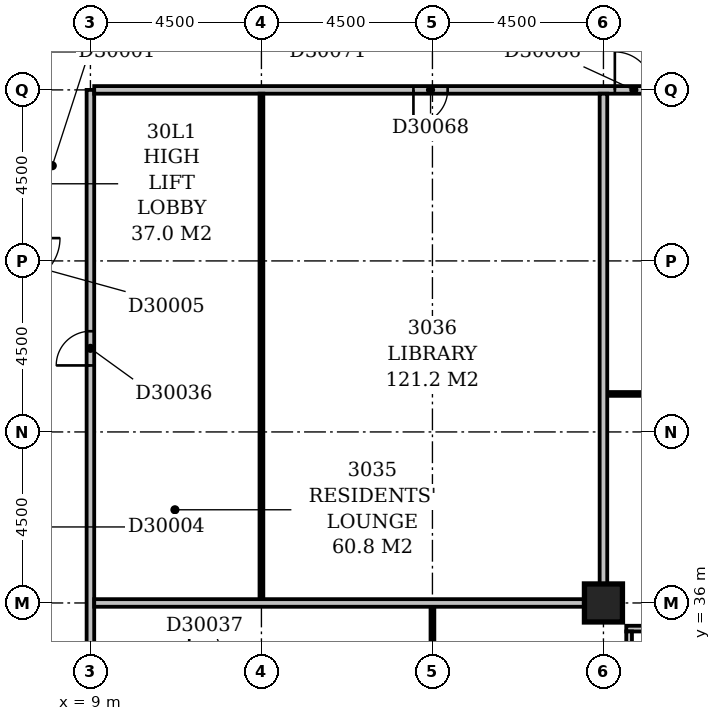
"""IFC4 building model, lengths in metres.
Left out: names, types, materials, properties, quantities, classifications, styles, units other than length and angle.
Written with IfcOpenShell. Run it as: python <this file> out.ifc"""

import sys

from ifc_helpers import new_model, si_unit, direction, frame, frame_2d, origin, origin_2d, place, context, subcontext, project, spatial, rectangle, extrude, element, fill, save


model = new_model("IFC4")
c1 = context("Model", 3, precision=1e-05, world=origin(), true_north=direction((0.0, 1.0)))
c2 = subcontext(c1, "Body", "Model", "MODEL_VIEW")
j1 = project(units=[si_unit("LENGTHUNIT", "METRE"), si_unit("PLANEANGLEUNIT", "RADIAN")], contexts=[c1])
p1 = place(None, origin())
s1 = spatial("IfcSite", under=j1, at=p1, CompositionType="ELEMENT")
p2 = place(p1, origin())
s2 = spatial("IfcBuilding", under=s1, at=p2, CompositionType="ELEMENT")
p3 = place(p2, frame((0.0, 0.0, 123.2)))
s3 = spatial("IfcBuildingStorey", under=s2, at=p3, CompositionType="ELEMENT", Elevation=123.2)
p4 = place(p3, frame((22.5, 36.0, -0.3), z_axis=(0.0, 0.0, 1.0), x_axis=(1.0, 0.0, 0.0)))
e1 = element("IfcColumn", 1, at=p4, inside=s3, PredefinedType="COLUMN", context=c2, shape_type="SweptSolid", body=[
    extrude(rectangle(XDim=1.0, YDim=1.0, at=origin_2d()), origin(), (0.0, 0.0, 1.0), 3.6),
])
p5 = place(p3, frame((23.175, 17.4, 0.0), z_axis=(0.0, 0.0, 1.0), x_axis=(0.0, 1.0, 0.0)))
e2 = element("IfcWall", 2, at=p5, inside=s3, PredefinedType="STANDARD", context=c2, shape_type="SweptSolid", body=[
    extrude(rectangle(XDim=17.85, YDim=0.15, at=frame_2d((8.925, 0.0))), origin(), (0.0, 0.0, 1.0), 2.7),
])
p6 = place(p5, frame((1.65, 0.0, 0.6)))
e3 = element("IfcOpeningElement", 3, at=p6, cuts=e2, PredefinedType="OPENING", context=c2, shape_type="SweptSolid", body=[
    extrude(rectangle(XDim=2.4, YDim=1.8, at=frame_2d((1.2, 0.9))), frame((0.0, 0.087, 0.0), z_axis=(0.0, -1.0, 0.0), x_axis=(1.0, 0.0, 0.0)), (0.0, 0.0, 1.0), 0.174),
])
p7 = place(p5, frame((6.15, 0.0, 0.6)))
e4 = element("IfcOpeningElement", 4, at=p7, cuts=e2, PredefinedType="OPENING", context=c2, shape_type="SweptSolid", body=[
    extrude(rectangle(XDim=2.4, YDim=1.8, at=frame_2d((1.2, 0.9))), frame((0.0, 0.087, 0.0), z_axis=(0.0, -1.0, 0.0), x_axis=(1.0, 0.0, 0.0)), (0.0, 0.0, 1.0), 0.174),
])
p8 = place(p5, frame((10.433, 0.0, 0.6)))
e5 = element("IfcOpeningElement", 5, at=p8, cuts=e2, PredefinedType="OPENING", context=c2, shape_type="SweptSolid", body=[
    extrude(rectangle(XDim=1.5, YDim=1.8, at=frame_2d((0.75, 0.9))), frame((0.0, 0.087, 0.0), z_axis=(0.0, -1.0, 0.0), x_axis=(1.0, 0.0, 0.0)), (0.0, 0.0, 1.0), 0.174),
])
p9 = place(p5, frame((15.15, 0.0, 0.6)))
e6 = element("IfcOpeningElement", 6, at=p9, cuts=e2, PredefinedType="OPENING", context=c2, shape_type="SweptSolid", body=[
    extrude(rectangle(XDim=2.4, YDim=1.8, at=frame_2d((1.2, 0.9))), frame((0.0, 0.087, 0.0), z_axis=(0.0, -1.0, 0.0), x_axis=(1.0, 0.0, 0.0)), (0.0, 0.0, 1.0), 0.174),
])
p10 = place(p3, frame((23.1, 35.325, 0.0), z_axis=(0.0, 0.0, 1.0), x_axis=(1.0, 0.0, 0.0)))
e7 = element("IfcWall", 7, at=p10, inside=s3, PredefinedType="STANDARD", context=c2, shape_type="SweptSolid", body=[
    extrude(rectangle(XDim=45.15, YDim=0.15, at=frame_2d((22.575, 0.0))), origin(), (0.0, 0.0, 1.0), 2.7),
])
p11 = place(p10, frame((0.45, 0.0, 0.6)))
e8 = element("IfcOpeningElement", 8, at=p11, cuts=e7, PredefinedType="OPENING", context=c2, shape_type="SweptSolid", body=[
    extrude(rectangle(XDim=2.4, YDim=1.8, at=frame_2d((1.2, 0.9))), frame((0.0, 0.087, 0.0), z_axis=(0.0, -1.0, 0.0), x_axis=(1.0, 0.0, 0.0)), (0.0, 0.0, 1.0), 0.174),
])
p12 = place(p10, frame((4.95, 0.0, 0.6)))
e9 = element("IfcOpeningElement", 9, at=p12, cuts=e7, PredefinedType="OPENING", context=c2, shape_type="SweptSolid", body=[
    extrude(rectangle(XDim=2.4, YDim=1.8, at=frame_2d((1.2, 0.9))), frame((0.0, 0.087, 0.0), z_axis=(0.0, -1.0, 0.0), x_axis=(1.0, 0.0, 0.0)), (0.0, 0.0, 1.0), 0.174),
])
p13 = place(p10, frame((10.598, 0.0, 0.6)))
e10 = element("IfcOpeningElement", 10, at=p13, cuts=e7, PredefinedType="OPENING", context=c2, shape_type="SweptSolid", body=[
    extrude(rectangle(XDim=1.5, YDim=1.8, at=frame_2d((0.75, 0.9))), frame((0.0, 0.087, 0.0), z_axis=(0.0, -1.0, 0.0), x_axis=(1.0, 0.0, 0.0)), (0.0, 0.0, 1.0), 0.174),
])
p14 = place(p10, frame((13.66, 0.0, 0.6)))
e11 = element("IfcOpeningElement", 11, at=p14, cuts=e7, PredefinedType="OPENING", context=c2, shape_type="SweptSolid", body=[
    extrude(rectangle(XDim=1.8, YDim=1.8, at=frame_2d((0.9, 0.9))), frame((0.0, 0.087, 0.0), z_axis=(0.0, -1.0, 0.0), x_axis=(1.0, 0.0, 0.0)), (0.0, 0.0, 1.0), 0.174),
])
p15 = place(p10, frame((18.45, 0.0, 0.6)))
e12 = element("IfcOpeningElement", 12, at=p15, cuts=e7, PredefinedType="OPENING", context=c2, shape_type="SweptSolid", body=[
    extrude(rectangle(XDim=2.4, YDim=1.8, at=frame_2d((1.2, 0.9))), frame((0.0, 0.087, 0.0), z_axis=(0.0, -1.0, 0.0), x_axis=(1.0, 0.0, 0.0)), (0.0, 0.0, 1.0), 0.174),
])
p16 = place(p10, frame((22.95, 0.0, 0.6)))
e13 = element("IfcOpeningElement", 13, at=p16, cuts=e7, PredefinedType="OPENING", context=c2, shape_type="SweptSolid", body=[
    extrude(rectangle(XDim=2.4, YDim=1.8, at=frame_2d((1.2, 0.9))), frame((0.0, 0.087, 0.0), z_axis=(0.0, -1.0, 0.0), x_axis=(1.0, 0.0, 0.0)), (0.0, 0.0, 1.0), 0.174),
])
p17 = place(p10, frame((27.45, 0.0, 0.6)))
e14 = element("IfcOpeningElement", 14, at=p17, cuts=e7, PredefinedType="OPENING", context=c2, shape_type="SweptSolid", body=[
    extrude(rectangle(XDim=2.4, YDim=1.8, at=frame_2d((1.2, 0.9))), frame((0.0, 0.087, 0.0), z_axis=(0.0, -1.0, 0.0), x_axis=(1.0, 0.0, 0.0)), (0.0, 0.0, 1.0), 0.174),
])
p18 = place(p10, frame((31.95, 0.0, 0.6)))
e15 = element("IfcOpeningElement", 15, at=p18, cuts=e7, PredefinedType="OPENING", context=c2, shape_type="SweptSolid", body=[
    extrude(rectangle(XDim=2.4, YDim=1.8, at=frame_2d((1.2, 0.9))), frame((0.0, 0.087, 0.0), z_axis=(0.0, -1.0, 0.0), x_axis=(1.0, 0.0, 0.0)), (0.0, 0.0, 1.0), 0.174),
])
p19 = place(p10, frame((36.131, 0.0, 0.6)))
e16 = element("IfcOpeningElement", 16, at=p19, cuts=e7, PredefinedType="OPENING", context=c2, shape_type="SweptSolid", body=[
    extrude(rectangle(XDim=2.4, YDim=1.8, at=frame_2d((1.2, 0.9))), frame((0.0, 0.087, 0.0), z_axis=(0.0, -1.0, 0.0), x_axis=(1.0, 0.0, 0.0)), (0.0, 0.0, 1.0), 0.174),
])
p20 = place(p10, frame((40.95, 0.0, 0.6)))
e17 = element("IfcOpeningElement", 17, at=p20, cuts=e7, PredefinedType="OPENING", context=c2, shape_type="SweptSolid", body=[
    extrude(rectangle(XDim=2.4, YDim=1.8, at=frame_2d((1.2, 0.9))), frame((0.0, 0.087, 0.0), z_axis=(0.0, -1.0, 0.0), x_axis=(1.0, 0.0, 0.0)), (0.0, 0.0, 1.0), 0.174),
])
p21 = place(p3, frame((18.0, 31.6, 0.0), z_axis=(0.0, 0.0, 1.0), x_axis=(0.0, 1.0, 0.0)))
e18 = element("IfcWall", 18, at=p21, inside=s3, PredefinedType="PARTITIONING", context=c2, shape_type="SweptSolid", body=[
    extrude(rectangle(XDim=4.3, YDim=0.1, at=frame_2d((2.15, 0.0))), origin(), (0.0, 0.0, 1.0), 3.3),
])
p22 = place(p21, frame((1.7, 0.0, 0.0)))
e19 = element("IfcOpeningElement", 19, at=p22, cuts=e18, PredefinedType="OPENING", context=c2, shape_type="SweptSolid", body=[
    extrude(rectangle(XDim=0.9, YDim=2.1, at=frame_2d((0.45, 1.05))), frame((0.0, 0.062, 0.0), z_axis=(0.0, -1.0, 0.0), x_axis=(1.0, 0.0, 0.0)), (0.0, 0.0, 1.0), 0.124),
])
p23 = place(p3, frame((9.0, 34.75, 0.0), z_axis=(0.0, 0.0, 1.0), x_axis=(0.0, 1.0, 0.0)))
e20 = element("IfcWall", 20, at=p23, inside=s3, PredefinedType="PARTITIONING", context=c2, shape_type="SweptSolid", body=[
    extrude(rectangle(XDim=14.75, YDim=0.2, at=frame_2d((7.375, 0.0))), origin(), (0.0, 0.0, 1.0), 3.3),
])
p24 = place(p23, frame((7.5, 0.0, 0.0)))
e21 = element("IfcOpeningElement", 21, at=p24, cuts=e20, PredefinedType="OPENING", context=c2, shape_type="SweptSolid", body=[
    extrude(rectangle(XDim=0.9, YDim=2.1, at=frame_2d((0.45, 1.05))), frame((0.0, 0.112, 0.0), z_axis=(0.0, -1.0, 0.0), x_axis=(1.0, 0.0, 0.0)), (0.0, 0.0, 1.0), 0.224),
])
p25 = place(p3, frame((9.1, 36.0, 0.0), z_axis=(0.0, 0.0, 1.0), x_axis=(1.0, 0.0, 0.0)))
e22 = element("IfcWall", 22, at=p25, inside=s3, PredefinedType="PARTITIONING", context=c2, shape_type="SweptSolid", body=[
    extrude(rectangle(XDim=12.9, YDim=0.2, at=frame_2d((6.45, 0.0))), origin(), (0.0, 0.0, 1.0), 3.3),
])
p26 = place(p3, frame((13.5, 36.1, 0.0), z_axis=(0.0, 0.0, 1.0), x_axis=(0.0, 1.0, 0.0)))
e23 = element("IfcWall", 23, at=p26, inside=s3, PredefinedType="PARTITIONING", context=c2, shape_type="SweptSolid", body=[
    extrude(rectangle(XDim=13.3, YDim=0.1, at=frame_2d((6.65, 0.0))), origin(), (0.0, 0.0, 1.0), 3.3),
])
p27 = place(p3, frame((22.5, 36.5, 0.0), z_axis=(0.0, 0.0, 1.0), x_axis=(0.0, 1.0, 0.0)))
e24 = element("IfcWall", 24, at=p27, inside=s3, PredefinedType="PARTITIONING", context=c2, shape_type="SweptSolid", body=[
    extrude(rectangle(XDim=12.9, YDim=0.2, at=frame_2d((6.45, 0.0))), origin(), (0.0, 0.0, 1.0), 3.3),
])
p28 = place(p3, frame((22.6, 41.5, 0.0), z_axis=(0.0, 0.0, 1.0), x_axis=(1.0, 0.0, 0.0)))
e25 = element("IfcWall", 25, at=p28, inside=s3, PredefinedType="PARTITIONING", context=c2, shape_type="SweptSolid", body=[
    extrude(rectangle(XDim=8.8, YDim=0.1, at=frame_2d((4.4, 0.0))), origin(), (0.0, 0.0, 1.0), 3.3),
])
p29 = place(p28, frame((1.7, 0.0, 0.0)))
e26 = element("IfcOpeningElement", 26, at=p29, cuts=e25, PredefinedType="OPENING", context=c2, shape_type="SweptSolid", body=[
    extrude(rectangle(XDim=0.9, YDim=2.1, at=frame_2d((0.45, 1.05))), frame((0.0, 0.062, 0.0), z_axis=(0.0, -1.0, 0.0), x_axis=(1.0, 0.0, 0.0)), (0.0, 0.0, 1.0), 0.124),
])
p30 = place(p28, frame((6.2, 0.0, 0.0)))
e27 = element("IfcOpeningElement", 27, at=p30, cuts=e25, PredefinedType="OPENING", context=c2, shape_type="SweptSolid", body=[
    extrude(rectangle(XDim=0.9, YDim=2.1, at=frame_2d((0.45, 1.05))), frame((0.0, 0.062, 0.0), z_axis=(0.0, -1.0, 0.0), x_axis=(1.0, 0.0, 0.0)), (0.0, 0.0, 1.0), 0.124),
])
p31 = place(p3, frame((9.1, 49.5, 0.0), z_axis=(0.0, 0.0, 1.0), x_axis=(1.0, 0.0, 0.0)))
e28 = element("IfcWall", 28, at=p31, inside=s3, PredefinedType="PARTITIONING", context=c2, shape_type="SweptSolid", body=[
    extrude(rectangle(XDim=41.55, YDim=0.2, at=frame_2d((20.775, 0.0))), origin(), (0.0, 0.0, 1.0), 3.3),
])
p32 = place(p31, frame((13.7, 0.0, 0.0)))
e29 = element("IfcOpeningElement", 29, at=p32, cuts=e28, PredefinedType="OPENING", context=c2, shape_type="SweptSolid", body=[
    extrude(rectangle(XDim=1.0, YDim=2.1, at=frame_2d((0.5, 1.05))), frame((0.0, 0.112, 0.0), z_axis=(0.0, -1.0, 0.0), x_axis=(1.0, 0.0, 0.0)), (0.0, 0.0, 1.0), 0.224),
])
p33 = place(p31, frame((27.8, 0.0, 0.0)))
e30 = element("IfcOpeningElement", 30, at=p33, cuts=e28, PredefinedType="OPENING", context=c2, shape_type="SweptSolid", body=[
    extrude(rectangle(XDim=1.0, YDim=2.1, at=frame_2d((0.5, 1.05))), frame((0.0, 0.112, 0.0), z_axis=(0.0, -1.0, 0.0), x_axis=(1.0, 0.0, 0.0)), (0.0, 0.0, 1.0), 0.224),
])
p34 = place(p31, frame((8.4, 0.0, 0.0)))
e31 = element("IfcOpeningElement", 31, at=p34, cuts=e28, PredefinedType="OPENING", context=c2, shape_type="SweptSolid", body=[
    extrude(rectangle(XDim=0.9, YDim=2.1, at=frame_2d((0.45, 1.05))), frame((0.0, 0.112, 0.0), z_axis=(0.0, -1.0, 0.0), x_axis=(1.0, 0.0, 0.0)), (0.0, 0.0, 1.0), 0.224),
])
p35 = place(p24, origin())
e32 = element("IfcDoor", 32, at=p35, inside=s3, OperationType="SINGLE_SWING_LEFT", PredefinedType="DOOR", context=c2, shape_type="SweptSolid", body=[
    extrude(rectangle(XDim=0.9, YDim=2.1, at=frame_2d((0.45, 1.05))), frame((0.0, 0.025, 0.0), z_axis=(0.0, -1.0, 0.0), x_axis=(1.0, 0.0, 0.0)), (0.0, 0.0, 1.0), 0.05),
])
fill(e21, e32)
p36 = place(p32, origin())
e33 = element("IfcDoor", 33, at=p36, inside=s3, OperationType="SINGLE_SWING_LEFT", PredefinedType="DOOR", context=c2, shape_type="SweptSolid", body=[
    extrude(rectangle(XDim=1.0, YDim=2.1, at=frame_2d((0.5, 1.05))), frame((0.0, 0.025, 0.0), z_axis=(0.0, -1.0, 0.0), x_axis=(1.0, 0.0, 0.0)), (0.0, 0.0, 1.0), 0.05),
])
fill(e29, e33)
p37 = place(p34, frame((0.9, 0.0, 0.0), z_axis=(0.0, 0.0, 1.0), x_axis=(-1.0, 0.0, 0.0)))
e34 = element("IfcDoor", 34, at=p37, inside=s3, OperationType="SINGLE_SWING_RIGHT", PredefinedType="DOOR", context=c2, shape_type="SweptSolid", body=[
    extrude(rectangle(XDim=0.9, YDim=2.1, at=frame_2d((0.45, 1.05))), frame((0.0, 0.025, 0.0), z_axis=(0.0, -1.0, 0.0), x_axis=(1.0, 0.0, 0.0)), (0.0, 0.0, 1.0), 0.05),
])
fill(e31, e34)
save(model, sys.argv[1])
